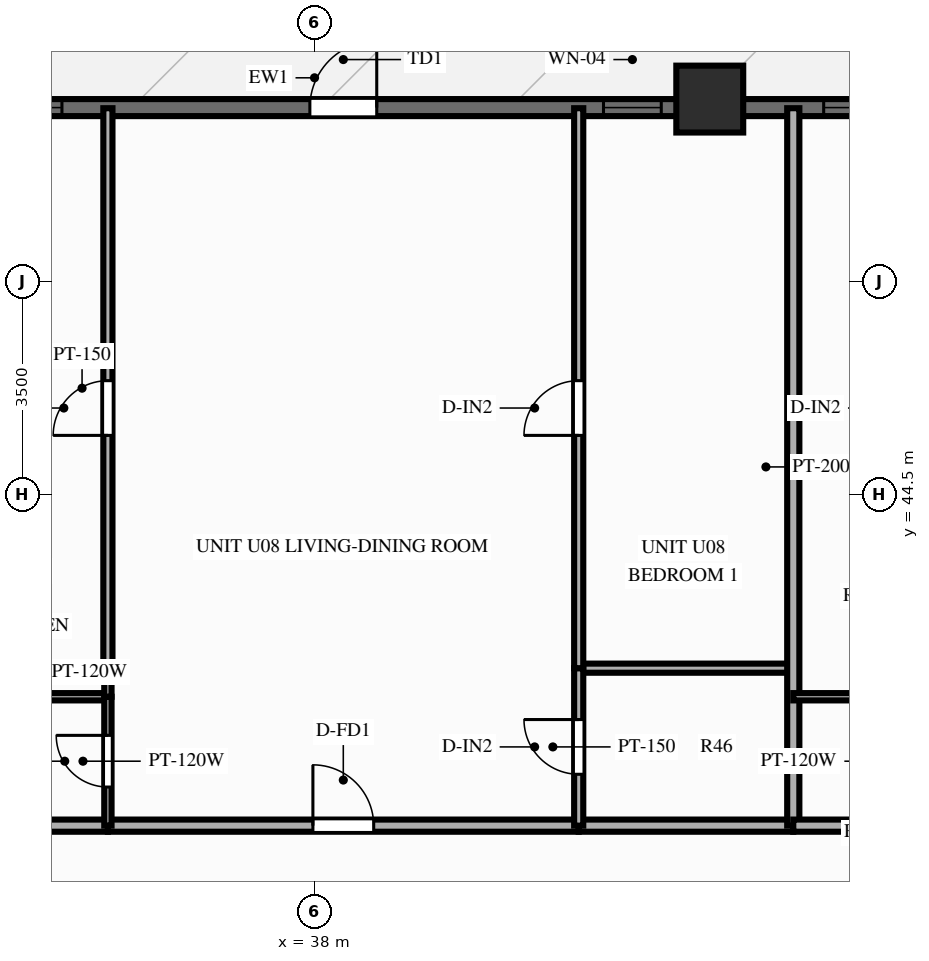
"""IFC4 building model, lengths in metres.
Left out: names, types, materials, properties, quantities, classifications, styles, units other than length and angle.
Written with IfcOpenShell. Run it as: python <this file> out.ifc"""

import sys

from ifc_helpers import new_model, si_unit, direction, frame, frame_2d, origin, origin_2d, place, context, subcontext, project, spatial, rectangle, extrude, source, transform, mapped, element, fill, save


model = new_model("IFC4")
c1 = context("Model", 3, precision=1e-05, world=origin(), true_north=direction((0.0, 1.0)))
c2 = subcontext(c1, "Body", "Model", "MODEL_VIEW")
j1 = project(units=[si_unit("LENGTHUNIT", "METRE"), si_unit("PLANEANGLEUNIT", "RADIAN")], contexts=[c1])
p1 = place(None, origin())
s1 = spatial("IfcSite", under=j1, at=p1, CompositionType="ELEMENT")
p2 = place(p1, origin())
s2 = spatial("IfcBuilding", under=s1, at=p2, CompositionType="ELEMENT")
p3 = place(p2, frame((0.0, 0.0, 19.4)))
s3 = spatial("IfcBuildingStorey", under=s2, at=p3, CompositionType="ELEMENT", Elevation=19.4)
m1 = source(origin(), c2, "Body", "SweptSolid", [
    extrude(rectangle(XDim=1.1, YDim=1.1, at=origin_2d()), origin(), (0.0, 0.0, 1.0), 3.0),
])
p4 = place(p3, frame((44.5, 51.0, 0.0), z_axis=(0.0, 0.0, 1.0), x_axis=(1.0, 0.0, 0.0)))
e1 = element("IfcColumn", 1, at=p4, inside=s3, PredefinedType="COLUMN", context=c2, shape_type="MappedRepresentation", body=[
    mapped(m1, transform((0.0, 0.0, 0.0), scale=1.0)),
])
p5 = place(p3, frame((15.5, 50.86, 0.0), z_axis=(0.0, 0.0, 1.0), x_axis=(1.0, 0.0, 0.0)))
e2 = element("IfcWall", 2, at=p5, inside=s3, PredefinedType="SOLIDWALL", context=c2, shape_type="SweptSolid", body=[
    extrude(rectangle(XDim=45.0, YDim=0.28, at=frame_2d((22.5, 0.0))), origin(), (0.0, 0.0, 1.0), 2.28),
])
p6 = place(p5, frame((0.76, 0.0, 0.25)))
e3 = element("IfcOpeningElement", 3, at=p6, cuts=e2, PredefinedType="OPENING", context=c2, shape_type="SweptSolid", body=[
    extrude(rectangle(XDim=1.2, YDim=1.5, at=frame_2d((0.6, 0.75))), frame((0.0, 0.152, 0.0), z_axis=(0.0, -1.0, 0.0), x_axis=(1.0, 0.0, 0.0)), (0.0, 0.0, 1.0), 0.304),
])
p7 = place(p5, frame((3.494, 0.0, 0.25)))
e4 = element("IfcOpeningElement", 4, at=p7, cuts=e2, PredefinedType="OPENING", context=c2, shape_type="SweptSolid", body=[
    extrude(rectangle(XDim=1.2, YDim=1.5, at=frame_2d((0.6, 0.75))), frame((0.0, 0.152, 0.0), z_axis=(0.0, -1.0, 0.0), x_axis=(1.0, 0.0, 0.0)), (0.0, 0.0, 1.0), 0.304),
])
p8 = place(p5, frame((8.741, 0.0, 0.25)))
e5 = element("IfcOpeningElement", 5, at=p8, cuts=e2, PredefinedType="OPENING", context=c2, shape_type="SweptSolid", body=[
    extrude(rectangle(XDim=1.2, YDim=1.5, at=frame_2d((0.6, 0.75))), frame((0.0, 0.152, 0.0), z_axis=(0.0, -1.0, 0.0), x_axis=(1.0, 0.0, 0.0)), (0.0, 0.0, 1.0), 0.304),
])
p9 = place(p5, frame((13.616, 0.0, 0.25)))
e6 = element("IfcOpeningElement", 6, at=p9, cuts=e2, PredefinedType="OPENING", context=c2, shape_type="SweptSolid", body=[
    extrude(rectangle(XDim=1.2, YDim=1.5, at=frame_2d((0.6, 0.75))), frame((0.0, 0.152, 0.0), z_axis=(0.0, -1.0, 0.0), x_axis=(1.0, 0.0, 0.0)), (0.0, 0.0, 1.0), 0.304),
])
p10 = place(p5, frame((17.146, 0.0, 0.25)))
e7 = element("IfcOpeningElement", 7, at=p10, cuts=e2, PredefinedType="OPENING", context=c2, shape_type="SweptSolid", body=[
    extrude(rectangle(XDim=1.2, YDim=1.5, at=frame_2d((0.6, 0.75))), frame((0.0, 0.152, 0.0), z_axis=(0.0, -1.0, 0.0), x_axis=(1.0, 0.0, 0.0)), (0.0, 0.0, 1.0), 0.304),
])
p11 = place(p5, frame((22.423, 0.0, 0.0)))
e8 = element("IfcOpeningElement", 8, at=p11, cuts=e2, PredefinedType="OPENING", context=c2, shape_type="SweptSolid", body=[
    extrude(rectangle(XDim=1.1, YDim=2.15, at=frame_2d((0.55, 1.075))), frame((0.0, 0.152, 0.0), z_axis=(0.0, -1.0, 0.0), x_axis=(1.0, 0.0, 0.0)), (0.0, 0.0, 1.0), 0.304),
])
p12 = place(p5, frame((27.252, 0.0, 0.25)))
e9 = element("IfcOpeningElement", 9, at=p12, cuts=e2, PredefinedType="OPENING", context=c2, shape_type="SweptSolid", body=[
    extrude(rectangle(XDim=0.95, YDim=1.5, at=frame_2d((0.475, 0.75))), frame((0.0, 0.152, 0.0), z_axis=(0.0, -1.0, 0.0), x_axis=(1.0, 0.0, 0.0)), (0.0, 0.0, 1.0), 0.304),
])
p13 = place(p5, frame((30.873, 0.0, 0.25)))
e10 = element("IfcOpeningElement", 10, at=p13, cuts=e2, PredefinedType="OPENING", context=c2, shape_type="SweptSolid", body=[
    extrude(rectangle(XDim=1.2, YDim=1.5, at=frame_2d((0.6, 0.75))), frame((0.0, 0.152, 0.0), z_axis=(0.0, -1.0, 0.0), x_axis=(1.0, 0.0, 0.0)), (0.0, 0.0, 1.0), 0.304),
])
p14 = place(p5, frame((33.113, 0.0, 0.25)))
e11 = element("IfcOpeningElement", 11, at=p14, cuts=e2, PredefinedType="OPENING", context=c2, shape_type="SweptSolid", body=[
    extrude(rectangle(XDim=1.2, YDim=1.5, at=frame_2d((0.6, 0.75))), frame((0.0, 0.152, 0.0), z_axis=(0.0, -1.0, 0.0), x_axis=(1.0, 0.0, 0.0)), (0.0, 0.0, 1.0), 0.304),
])
p15 = place(p5, frame((35.624, 0.0, 0.25)))
e12 = element("IfcOpeningElement", 12, at=p15, cuts=e2, PredefinedType="OPENING", context=c2, shape_type="SweptSolid", body=[
    extrude(rectangle(XDim=1.2, YDim=1.5, at=frame_2d((0.6, 0.75))), frame((0.0, 0.152, 0.0), z_axis=(0.0, -1.0, 0.0), x_axis=(1.0, 0.0, 0.0)), (0.0, 0.0, 1.0), 0.304),
])
p16 = place(p5, frame((38.097, 0.0, 0.25)))
e13 = element("IfcOpeningElement", 13, at=p16, cuts=e2, PredefinedType="OPENING", context=c2, shape_type="SweptSolid", body=[
    extrude(rectangle(XDim=1.2, YDim=1.5, at=frame_2d((0.6, 0.75))), frame((0.0, 0.152, 0.0), z_axis=(0.0, -1.0, 0.0), x_axis=(1.0, 0.0, 0.0)), (0.0, 0.0, 1.0), 0.304),
])
p17 = place(p5, frame((40.336, 0.0, 0.25)))
e14 = element("IfcOpeningElement", 14, at=p17, cuts=e2, PredefinedType="OPENING", context=c2, shape_type="SweptSolid", body=[
    extrude(rectangle(XDim=1.2, YDim=1.5, at=frame_2d((0.6, 0.75))), frame((0.0, 0.152, 0.0), z_axis=(0.0, -1.0, 0.0), x_axis=(1.0, 0.0, 0.0)), (0.0, 0.0, 1.0), 0.304),
])
p18 = place(p5, frame((42.743, 0.0, 0.25)))
e15 = element("IfcOpeningElement", 15, at=p18, cuts=e2, PredefinedType="OPENING", context=c2, shape_type="SweptSolid", body=[
    extrude(rectangle(XDim=1.2, YDim=1.5, at=frame_2d((0.6, 0.75))), frame((0.0, 0.152, 0.0), z_axis=(0.0, -1.0, 0.0), x_axis=(1.0, 0.0, 0.0)), (0.0, 0.0, 1.0), 0.304),
])
p19 = place(p3, frame((31.852, 39.05, 0.0), z_axis=(0.0, 0.0, 1.0), x_axis=(1.0, 0.0, 0.0)))
e16 = element("IfcWall", 16, at=p19, inside=s3, PredefinedType="PARTITIONING", context=c2, shape_type="SweptSolid", body=[
    extrude(rectangle(XDim=2.75, YDim=0.2, at=frame_2d((1.375, 0.0))), origin(), (0.0, 0.0, 1.0), 2.79),
])
p20 = place(p3, frame((34.602, 39.05, 0.0), z_axis=(0.0, 0.0, 1.0), x_axis=(1.0, 0.0, 0.0)))
e17 = element("IfcWall", 17, at=p20, inside=s3, PredefinedType="PARTITIONING", context=c2, shape_type="SweptSolid", body=[
    extrude(rectangle(XDim=7.743, YDim=0.2, at=frame_2d((3.871, 0.0))), origin(), (0.0, 0.0, 1.0), 2.79),
])
p21 = place(p20, frame((3.371, 0.0, 0.0)))
e18 = element("IfcOpeningElement", 18, at=p21, cuts=e17, PredefinedType="OPENING", context=c2, shape_type="SweptSolid", body=[
    extrude(rectangle(XDim=1.0, YDim=2.15, at=frame_2d((0.5, 1.075))), frame((0.0, 0.112, 0.0), z_axis=(0.0, -1.0, 0.0), x_axis=(1.0, 0.0, 0.0)), (0.0, 0.0, 1.0), 0.224),
])
p22 = place(p3, frame((42.344, 39.05, 0.0), z_axis=(0.0, 0.0, 1.0), x_axis=(1.0, 0.0, 0.0)))
e19 = element("IfcWall", 19, at=p22, inside=s3, PredefinedType="PARTITIONING", context=c2, shape_type="SweptSolid", body=[
    extrude(rectangle(XDim=3.529, YDim=0.2, at=frame_2d((1.764, 0.0))), origin(), (0.0, 0.0, 1.0), 2.79),
])
p23 = place(p3, frame((31.852, 41.17, 0.0), z_axis=(0.0, 0.0, 1.0), x_axis=(1.0, 0.0, 0.0)))
e20 = element("IfcWall", 20, at=p23, inside=s3, PredefinedType="PARTITIONING", context=c2, shape_type="SweptSolid", body=[
    extrude(rectangle(XDim=2.75, YDim=0.12, at=frame_2d((1.375, 0.0))), origin(), (0.0, 0.0, 1.0), 2.79),
])
p24 = place(p3, frame((42.344, 41.64, 0.0), z_axis=(0.0, 0.0, 1.0), x_axis=(1.0, 0.0, 0.0)))
e21 = element("IfcWall", 21, at=p24, inside=s3, PredefinedType="PARTITIONING", context=c2, shape_type="SweptSolid", body=[
    extrude(rectangle(XDim=3.529, YDim=0.15, at=frame_2d((1.764, 0.0))), origin(), (0.0, 0.0, 1.0), 2.79),
])
p25 = place(p3, frame((34.602, 39.05, 0.0), z_axis=(0.0, 0.0, 1.0), x_axis=(0.0, 1.0, 0.0)))
e22 = element("IfcWall", 22, at=p25, inside=s3, PredefinedType="PARTITIONING", context=c2, shape_type="SweptSolid", body=[
    extrude(rectangle(XDim=2.12, YDim=0.12, at=frame_2d((1.06, 0.0))), origin(), (0.0, 0.0, 1.0), 2.79),
])
p26 = place(p25, frame((0.635, 0.0, 0.0)))
e23 = element("IfcOpeningElement", 23, at=p26, cuts=e22, PredefinedType="OPENING", context=c2, shape_type="SweptSolid", body=[
    extrude(rectangle(XDim=0.85, YDim=2.05, at=frame_2d((0.425, 1.025))), frame((0.0, 0.072, 0.0), z_axis=(0.0, -1.0, 0.0), x_axis=(1.0, 0.0, 0.0)), (0.0, 0.0, 1.0), 0.144),
])
p27 = place(p3, frame((34.602, 41.17, 0.0), z_axis=(0.0, 0.0, 1.0), x_axis=(0.0, 1.0, 0.0)))
e24 = element("IfcWall", 24, at=p27, inside=s3, PredefinedType="PARTITIONING", context=c2, shape_type="SweptSolid", body=[
    extrude(rectangle(XDim=0.47, YDim=0.12, at=frame_2d((0.235, 0.0))), origin(), (0.0, 0.0, 1.0), 2.79),
])
p28 = place(p3, frame((34.602, 41.64, 0.0), z_axis=(0.0, 0.0, 1.0), x_axis=(0.0, 1.0, 0.0)))
e25 = element("IfcWall", 25, at=p28, inside=s3, PredefinedType="PARTITIONING", context=c2, shape_type="SweptSolid", body=[
    extrude(rectangle(XDim=9.21, YDim=0.15, at=frame_2d((4.605, 0.0))), origin(), (0.0, 0.0, 1.0), 2.79),
])
p29 = place(p28, frame((3.829, 0.0, 0.0)))
e26 = element("IfcOpeningElement", 26, at=p29, cuts=e25, PredefinedType="OPENING", context=c2, shape_type="SweptSolid", body=[
    extrude(rectangle(XDim=0.9, YDim=2.1, at=frame_2d((0.45, 1.05))), frame((0.0, 0.087, 0.0), z_axis=(0.0, -1.0, 0.0), x_axis=(1.0, 0.0, 0.0)), (0.0, 0.0, 1.0), 0.174),
])
p30 = place(p3, frame((42.344, 39.05, 0.0), z_axis=(0.0, 0.0, 1.0), x_axis=(0.0, 1.0, 0.0)))
e27 = element("IfcWall", 27, at=p30, inside=s3, PredefinedType="PARTITIONING", context=c2, shape_type="SweptSolid", body=[
    extrude(rectangle(XDim=2.59, YDim=0.15, at=frame_2d((1.295, 0.0))), origin(), (0.0, 0.0, 1.0), 2.79),
])
p31 = place(p30, frame((0.845, 0.0, 0.0)))
e28 = element("IfcOpeningElement", 28, at=p31, cuts=e27, PredefinedType="OPENING", context=c2, shape_type="SweptSolid", body=[
    extrude(rectangle(XDim=0.9, YDim=2.1, at=frame_2d((0.45, 1.05))), frame((0.0, 0.087, 0.0), z_axis=(0.0, -1.0, 0.0), x_axis=(1.0, 0.0, 0.0)), (0.0, 0.0, 1.0), 0.174),
])
p32 = place(p3, frame((42.344, 41.64, 0.0), z_axis=(0.0, 0.0, 1.0), x_axis=(0.0, 1.0, 0.0)))
e29 = element("IfcWall", 29, at=p32, inside=s3, PredefinedType="PARTITIONING", context=c2, shape_type="SweptSolid", body=[
    extrude(rectangle(XDim=9.21, YDim=0.15, at=frame_2d((4.605, 0.0))), origin(), (0.0, 0.0, 1.0), 2.79),
])
p33 = place(p32, frame((3.829, 0.0, 0.0)))
e30 = element("IfcOpeningElement", 30, at=p33, cuts=e29, PredefinedType="OPENING", context=c2, shape_type="SweptSolid", body=[
    extrude(rectangle(XDim=0.9, YDim=2.1, at=frame_2d((0.45, 1.05))), frame((0.0, 0.087, 0.0), z_axis=(0.0, -1.0, 0.0), x_axis=(1.0, 0.0, 0.0)), (0.0, 0.0, 1.0), 0.174),
])
p34 = place(p3, frame((45.873, 39.05, 0.0), z_axis=(0.0, 0.0, 1.0), x_axis=(0.0, 1.0, 0.0)))
e31 = element("IfcWall", 31, at=p34, inside=s3, PredefinedType="PARTITIONING", context=c2, shape_type="SweptSolid", body=[
    extrude(rectangle(XDim=11.8, YDim=0.2, at=frame_2d((5.9, 0.0))), origin(), (0.0, 0.0, 1.0), 2.79),
])
p35 = place(p3, frame((45.873, 39.05, 0.0), z_axis=(0.0, 0.0, 1.0), x_axis=(1.0, 0.0, 0.0)))
e32 = element("IfcWall", 32, at=p35, inside=s3, PredefinedType="PARTITIONING", context=c2, shape_type="SweptSolid", body=[
    extrude(rectangle(XDim=2.2, YDim=0.2, at=frame_2d((1.1, 0.0))), origin(), (0.0, 0.0, 1.0), 2.79),
])
p36 = place(p3, frame((45.873, 41.17, 0.0), z_axis=(0.0, 0.0, 1.0), x_axis=(1.0, 0.0, 0.0)))
e33 = element("IfcWall", 33, at=p36, inside=s3, PredefinedType="PARTITIONING", context=c2, shape_type="SweptSolid", body=[
    extrude(rectangle(XDim=2.2, YDim=0.12, at=frame_2d((1.1, 0.0))), origin(), (0.0, 0.0, 1.0), 2.79),
])
m2 = source(origin(), c2, "Body", "SweptSolid", [
    extrude(rectangle(XDim=1.2, YDim=1.5, at=frame_2d((0.6, 0.75))), frame((0.0, 0.03, 0.0), z_axis=(0.0, -1.0, 0.0), x_axis=(1.0, 0.0, 0.0)), (0.0, 0.0, 1.0), 0.06),
])
p37 = place(p10, origin())
e34 = element("IfcWindow", 34, at=p37, inside=s3, PartitioningType="SINGLE_PANEL", PredefinedType="WINDOW", context=c2, shape_type="MappedRepresentation", body=[
    mapped(m2, transform((0.0, 0.0, 0.0), scale=1.0)),
])
fill(e7, e34)
m3 = source(origin(), c2, "Body", "SweptSolid", [
    extrude(rectangle(XDim=1.1, YDim=2.15, at=frame_2d((0.55, 1.075))), frame((0.0, 0.025, 0.0), z_axis=(0.0, -1.0, 0.0), x_axis=(1.0, 0.0, 0.0)), (0.0, 0.0, 1.0), 0.05),
])
p38 = place(p11, origin())
e35 = element("IfcDoor", 35, at=p38, inside=s3, OperationType="SINGLE_SWING_RIGHT", PredefinedType="DOOR", context=c2, shape_type="MappedRepresentation", body=[
    mapped(m3, transform((0.0, 0.0, 0.0), scale=1.0)),
])
fill(e8, e35)
m4 = source(origin(), c2, "Body", "SweptSolid", [
    extrude(rectangle(XDim=0.95, YDim=1.5, at=frame_2d((0.475, 0.75))), frame((0.0, 0.03, 0.0), z_axis=(0.0, -1.0, 0.0), x_axis=(1.0, 0.0, 0.0)), (0.0, 0.0, 1.0), 0.06),
])
p39 = place(p12, origin())
e36 = element("IfcWindow", 36, at=p39, inside=s3, PartitioningType="SINGLE_PANEL", PredefinedType="WINDOW", context=c2, shape_type="MappedRepresentation", body=[
    mapped(m4, transform((0.0, 0.0, 0.0), scale=1.0)),
])
fill(e9, e36)
p40 = place(p13, origin())
e37 = element("IfcWindow", 37, at=p40, inside=s3, PartitioningType="SINGLE_PANEL", PredefinedType="WINDOW", context=c2, shape_type="MappedRepresentation", body=[
    mapped(m2, transform((0.0, 0.0, 0.0), scale=1.0)),
])
fill(e10, e37)
m5 = source(origin(), c2, "Body", "SweptSolid", [
    extrude(rectangle(XDim=1.0, YDim=2.15, at=frame_2d((0.5, 1.075))), frame((0.0, 0.025, 0.0), z_axis=(0.0, -1.0, 0.0), x_axis=(1.0, 0.0, 0.0)), (0.0, 0.0, 1.0), 0.05),
])
p41 = place(p21, origin())
e38 = element("IfcDoor", 38, at=p41, inside=s3, OperationType="SINGLE_SWING_LEFT", PredefinedType="DOOR", context=c2, shape_type="MappedRepresentation", body=[
    mapped(m5, transform((0.0, 0.0, 0.0), scale=1.0)),
])
fill(e18, e38)
m6 = source(origin(), c2, "Body", "SweptSolid", [
    extrude(rectangle(XDim=0.85, YDim=2.05, at=frame_2d((0.425, 1.025))), frame((0.0, 0.025, 0.0), z_axis=(0.0, -1.0, 0.0), x_axis=(1.0, 0.0, 0.0)), (0.0, 0.0, 1.0), 0.05),
])
p42 = place(p26, origin())
e39 = element("IfcDoor", 39, at=p42, inside=s3, OperationType="SINGLE_SWING_RIGHT", PredefinedType="DOOR", context=c2, shape_type="MappedRepresentation", body=[
    mapped(m6, transform((0.0, 0.0, 0.0), scale=1.0)),
])
fill(e23, e39)
m7 = source(origin(), c2, "Body", "SweptSolid", [
    extrude(rectangle(XDim=0.9, YDim=2.1, at=frame_2d((0.45, 1.05))), frame((0.0, 0.025, 0.0), z_axis=(0.0, -1.0, 0.0), x_axis=(1.0, 0.0, 0.0)), (0.0, 0.0, 1.0), 0.05),
])
p43 = place(p29, origin())
e40 = element("IfcDoor", 40, at=p43, inside=s3, OperationType="SINGLE_SWING_LEFT", PredefinedType="DOOR", context=c2, shape_type="MappedRepresentation", body=[
    mapped(m7, transform((0.0, 0.0, 0.0), scale=1.0)),
])
fill(e26, e40)
p44 = place(p31, origin())
e41 = element("IfcDoor", 41, at=p44, inside=s3, OperationType="SINGLE_SWING_RIGHT", PredefinedType="DOOR", context=c2, shape_type="MappedRepresentation", body=[
    mapped(m7, transform((0.0, 0.0, 0.0), scale=1.0)),
])
fill(e28, e41)
p45 = place(p33, origin())
e42 = element("IfcDoor", 42, at=p45, inside=s3, OperationType="SINGLE_SWING_LEFT", PredefinedType="DOOR", context=c2, shape_type="MappedRepresentation", body=[
    mapped(m7, transform((0.0, 0.0, 0.0), scale=1.0)),
])
fill(e30, e42)
save(model, sys.argv[1])
